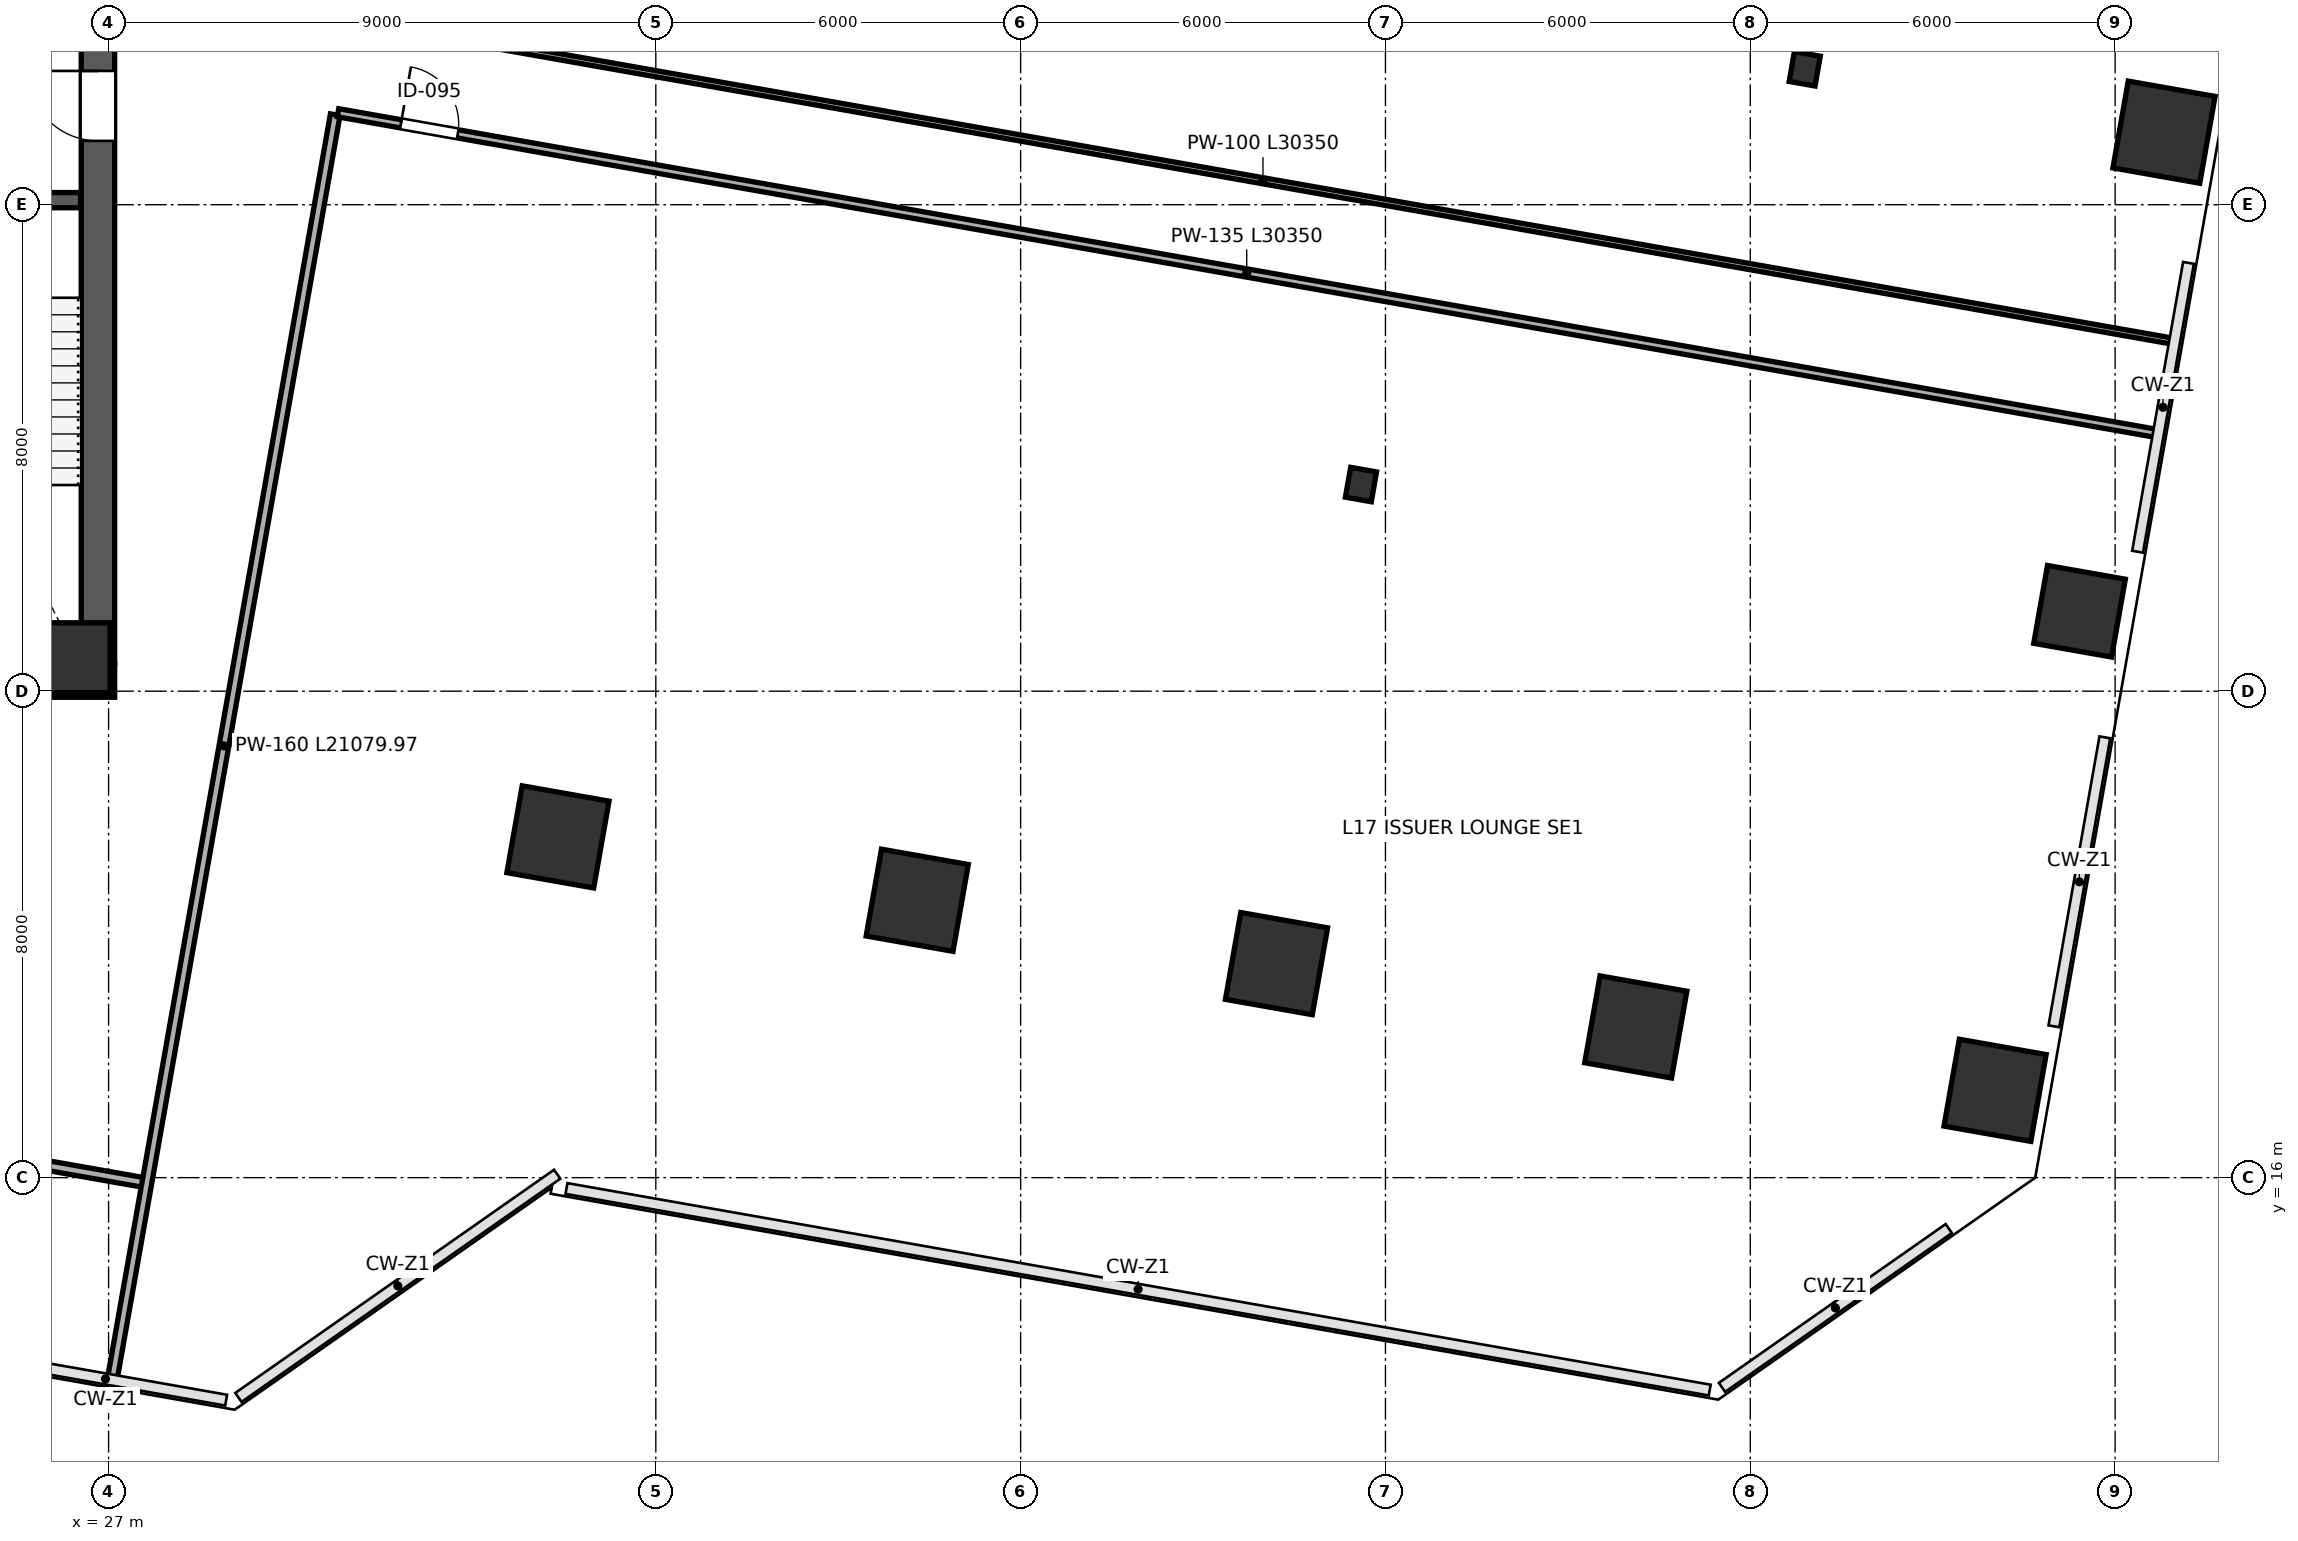
"""IFC4 building model, lengths in metres.
Left out: names, types, materials, properties, quantities, classifications, styles, units other than length and angle.
Written with IfcOpenShell. Run it as: python <this file> out.ifc"""

import sys

from ifc_helpers import new_model, si_unit, direction, frame, frame_2d, origin, origin_2d, place, context, subcontext, project, spatial, rectangle, i_section, extrude, clip, halfspace, source, transform, mapped, element, fill, save


model = new_model("IFC4")
c1 = context("Model", 3, precision=1e-05, world=origin(), true_north=direction((0.0, 1.0)))
c2 = subcontext(c1, "Body", "Model", "MODEL_VIEW")
j1 = project(units=[si_unit("LENGTHUNIT", "METRE"), si_unit("PLANEANGLEUNIT", "RADIAN")], contexts=[c1])
p1 = place(None, origin())
s1 = spatial("IfcSite", under=j1, at=p1, CompositionType="ELEMENT")
p2 = place(p1, origin())
s2 = spatial("IfcBuilding", under=s1, at=p2, CompositionType="ELEMENT")
p3 = place(p2, frame((0.0, 0.0, 79.0)))
s3 = spatial("IfcBuildingStorey", under=s2, at=p3, CompositionType="ELEMENT", Elevation=79.0)
m1 = source(origin(), c2, "Body", "SweptSolid", [
    extrude(rectangle(XDim=1.15, YDim=1.15, at=origin_2d()), origin(), (0.0, 0.0, 1.0), 4.198),
])
p4 = place(p3, frame((26.45, 24.55, 0.001), z_axis=(0.0, 0.0, 1.0), x_axis=(1.0, 0.0, 0.0)))
e1 = element("IfcColumn", 1, at=p4, inside=s3, PredefinedType="COLUMN", context=c2, shape_type="MappedRepresentation", body=[
    mapped(m1, transform((0.0, 0.0, 0.0), scale=1.0)),
])
p5 = place(p3, frame((34.39, 21.604, 0.0), z_axis=(-0.054498728191, -0.066081879773, 0.996324783287), x_axis=(-0.649682625817, 0.760060030732, 0.01487398385)))
e2 = element("IfcColumn", 2, at=p5, inside=s3, PredefinedType="COLUMN", context=c2, shape_type="Clipping", body=[
    clip(clip(extrude(rectangle(XDim=1.45, YDim=1.45, at=origin_2d()), origin(), (0.0, 0.0, 1.0), 4.215), halfspace(frame((0.0, 0.0, 0.073), z_axis=(0.0, 0.0, -1.0), x_axis=(1.0, 0.0, 0.0)), False)), halfspace(frame((0.0, 0.0, 4.142), z_axis=(0.0, 0.0, 1.0), x_axis=(1.0, 0.0, 0.0)), False)),
])
p6 = place(p3, frame((40.299, 20.562, 0.0), z_axis=(-0.060063414038, -0.096390228875, 0.993529722792), x_axis=(-0.744577265686, 0.667244896819, 0.019721640207)))
e3 = element("IfcColumn", 3, at=p6, inside=s3, PredefinedType="COLUMN", context=c2, shape_type="Clipping", body=[
    clip(clip(extrude(rectangle(XDim=1.45, YDim=1.45, at=origin_2d()), origin(), (0.0, 0.0, 1.0), 4.227), halfspace(frame((0.0, 0.0, 0.097), z_axis=(0.0, 0.0, -1.0), x_axis=(1.0, 0.0, 0.0)), False)), halfspace(frame((0.0, 0.0, 4.131), z_axis=(0.0, 0.0, 1.0), x_axis=(1.0, 0.0, 0.0)), False)),
])
p7 = place(p3, frame((46.208, 19.52, 0.0), z_axis=(-0.065535255542, -0.126352432986, 0.989818262591), x_axis=(-0.795075682772, 0.60600639496, 0.024716551802)))
e4 = element("IfcColumn", 4, at=p7, inside=s3, PredefinedType="COLUMN", context=c2, shape_type="Clipping", body=[
    clip(clip(extrude(rectangle(XDim=1.45, YDim=1.45, at=origin_2d()), origin(), (0.0, 0.0, 1.0), 4.243), halfspace(frame((0.0, 0.0, 0.122), z_axis=(0.0, 0.0, -1.0), x_axis=(1.0, 0.0, 0.0)), False)), halfspace(frame((0.0, 0.0, 4.122), z_axis=(0.0, 0.0, 1.0), x_axis=(1.0, 0.0, 0.0)), False)),
])
p8 = place(p3, frame((47.597, 27.398, 0.0), z_axis=(-0.025165317474, -0.134003875884, 0.990661227688), x_axis=(-0.936137546219, 0.350836040709, 0.023676298264)))
e5 = element("IfcColumn", 5, at=p8, inside=s3, PredefinedType="COLUMN", context=c2, shape_type="Clipping", body=[
    clip(clip(extrude(i_section(OverallWidth=0.432, OverallDepth=0.498, WebThickness=0.056, FlangeThickness=0.089, FilletRadius=0.015, at=origin_2d()), origin(), (0.0, 0.0, 1.0), 4.24), halfspace(frame((0.0, 0.0, 0.04), z_axis=(0.0, 0.0, -1.0), x_axis=(1.0, 0.0, 0.0)), False)), halfspace(frame((0.0, 0.0, 4.2), z_axis=(0.0, 0.0, 1.0), x_axis=(1.0, 0.0, 0.0)), False)),
])
p9 = place(p3, frame((48.987, 35.277, 0.0), z_axis=(0.015305043321, -0.141485344082, 0.989822031003), x_axis=(-0.997581110031, 0.064971116092, 0.024712000799)))
e6 = element("IfcColumn", 6, at=p9, inside=s3, PredefinedType="COLUMN", context=c2, shape_type="Clipping", body=[
    clip(clip(extrude(i_section(OverallWidth=0.432, OverallDepth=0.498, WebThickness=0.056, FlangeThickness=0.089, FilletRadius=0.015, at=origin_2d()), origin(), (0.0, 0.0, 1.0), 4.243), halfspace(frame((0.0, 0.0, 0.042), z_axis=(0.0, 0.0, -1.0), x_axis=(1.0, 0.0, 0.0)), False)), halfspace(frame((0.0, 0.0, 4.202), z_axis=(0.0, 0.0, 1.0), x_axis=(1.0, 0.0, 0.0)), False)),
])
p10 = place(p3, frame((52.117, 18.478, 0.0), z_axis=(-0.07095737447, -0.155945868186, 0.985213650537), x_axis=(-0.825524116158, 0.563582114995, 0.029751189863)))
e7 = element("IfcColumn", 7, at=p10, inside=s3, PredefinedType="COLUMN", context=c2, shape_type="Clipping", body=[
    clip(clip(extrude(rectangle(XDim=1.45, YDim=1.45, at=origin_2d()), origin(), (0.0, 0.0, 1.0), 4.263), halfspace(frame((0.0, 0.0, 0.147), z_axis=(0.0, 0.0, -1.0), x_axis=(1.0, 0.0, 0.0)), False)), halfspace(frame((0.0, 0.0, 4.116), z_axis=(0.0, 0.0, 1.0), x_axis=(1.0, 0.0, 0.0)), False)),
])
p11 = place(p3, frame((54.896, 34.235, 0.0), z_axis=(0.009564159458, -0.171009461927, 0.985222965011), x_axis=(-0.992824461786, 0.115823176478, 0.029741887466)))
e8 = element("IfcColumn", 8, at=p11, inside=s3, PredefinedType="COLUMN", context=c2, shape_type="Clipping", body=[
    clip(clip(extrude(i_section(OverallWidth=0.432, OverallDepth=0.498, WebThickness=0.056, FlangeThickness=0.089, FilletRadius=0.015, at=origin_2d()), origin(), (0.0, 0.0, 1.0), 4.263), halfspace(frame((0.0, 0.0, 0.05), z_axis=(0.0, 0.0, -1.0), x_axis=(1.0, 0.0, 0.0)), False)), halfspace(frame((0.0, 0.0, 4.213), z_axis=(0.0, 0.0, 1.0), x_axis=(1.0, 0.0, 0.0)), False)),
])
p12 = place(p3, frame((58.026, 17.436, 0.0), z_axis=(-0.076146400638, -0.185097832517, 0.979765542396), x_axis=(-0.846024447337, 0.532010050022, 0.034755448264)))
e9 = element("IfcColumn", 9, at=p12, inside=s3, PredefinedType="COLUMN", context=c2, shape_type="Clipping", body=[
    clip(clip(extrude(rectangle(XDim=1.45, YDim=1.45, at=origin_2d()), origin(), (0.0, 0.0, 1.0), 4.287), halfspace(frame((0.0, 0.0, 0.172), z_axis=(0.0, 0.0, -1.0), x_axis=(1.0, 0.0, 0.0)), False)), halfspace(frame((0.0, 0.0, 4.114), z_axis=(0.0, 0.0, 1.0), x_axis=(1.0, 0.0, 0.0)), False)),
])
p13 = place(p3, frame((59.415, 25.314, 0.0), z_axis=(-0.036138627315, -0.192720345348, 0.9805880216), x_axis=(-0.936553761677, 0.348866347771, 0.034048830838)))
e10 = element("IfcColumn", 10, at=p13, inside=s3, PredefinedType="COLUMN", context=c2, shape_type="Clipping", body=[
    clip(clip(extrude(rectangle(XDim=1.3, YDim=1.3, at=origin_2d()), origin(), (0.0, 0.0, 1.0), 4.283), halfspace(frame((0.0, 0.0, 0.151), z_axis=(0.0, 0.0, -1.0), x_axis=(1.0, 0.0, 0.0)), False)), halfspace(frame((0.0, 0.0, 4.132), z_axis=(0.0, 0.0, 1.0), x_axis=(1.0, 0.0, 0.0)), False)),
])
p14 = place(p3, frame((60.804, 33.193, 0.0), z_axis=(0.003929750961, -0.200132534446, 0.979760953352), x_axis=(-0.987958013285, 0.150767210127, 0.03475934891)))
e11 = element("IfcColumn", 11, at=p14, inside=s3, PredefinedType="COLUMN", context=c2, shape_type="Clipping", body=[
    clip(clip(extrude(rectangle(XDim=1.45, YDim=1.45, at=origin_2d()), origin(), (0.0, 0.0, 1.0), 4.287), halfspace(frame((0.0, 0.0, 0.172), z_axis=(0.0, 0.0, -1.0), x_axis=(1.0, 0.0, 0.0)), False)), halfspace(frame((0.0, 0.0, 4.114), z_axis=(0.0, 0.0, 1.0), x_axis=(1.0, 0.0, 0.0)), False)),
])
p15 = place(p3, frame((26.825, 24.45, 0.0), z_axis=(0.0, 0.0, 1.0), x_axis=(0.0, 1.0, 0.0)))
e12 = element("IfcWall", 12, at=p15, inside=s3, PredefinedType="SHEAR", context=c2, shape_type="SweptSolid", body=[
    extrude(rectangle(XDim=15.1, YDim=0.55, at=frame_2d((7.55, 0.0))), origin(), (0.0, 0.0, 1.0), 3.96),
])
p16 = place(p15, frame((8.6, 0.0, 0.0)))
e13 = element("IfcOpeningElement", 13, at=p16, cuts=e12, PredefinedType="OPENING", context=c2, shape_type="SweptSolid", body=[
    extrude(rectangle(XDim=1.15, YDim=2.2, at=frame_2d((0.575, 1.1))), frame((0.0, 0.285, 0.0), z_axis=(0.0, -1.0, 0.0), x_axis=(1.0, 0.0, 0.0)), (0.0, 0.0, 1.0), 0.57),
])
p17 = place(p3, frame((8.9, 24.175, 0.0), z_axis=(0.0, 0.0, 1.0), x_axis=(1.0, 0.0, 0.0)))
e14 = element("IfcWall", 14, at=p17, inside=s3, PredefinedType="SHEAR", context=c2, shape_type="SweptSolid", body=[
    extrude(rectangle(XDim=18.2, YDim=0.55, at=frame_2d((9.1, 0.0))), origin(), (0.0, 0.0, 1.0), 3.96),
])
p18 = place(p3, frame((23.19, 32.075, 0.0), z_axis=(0.0, 0.0, 1.0), x_axis=(1.0, 0.0, 0.0)))
e15 = element("IfcWall", 15, at=p18, inside=s3, PredefinedType="SHEAR", context=c2, shape_type="SweptSolid", body=[
    extrude(rectangle(XDim=3.35, YDim=0.25, at=frame_2d((1.675, 0.0))), origin(), (0.0, 0.0, 1.0), 3.96),
])
p19 = place(p18, frame((0.85, 0.0, 0.0)))
e16 = element("IfcOpeningElement", 16, at=p19, cuts=e15, PredefinedType="OPENING", context=c2, shape_type="SweptSolid", body=[
    extrude(rectangle(XDim=1.15, YDim=2.2, at=frame_2d((0.575, 1.1))), frame((0.0, 0.135, 0.0), z_axis=(0.0, -1.0, 0.0), x_axis=(1.0, 0.0, 0.0)), (0.0, 0.0, 1.0), 0.27),
])
p20 = place(p3, frame((9.765, 19.061, 0.0), z_axis=(0.0, 0.0, 1.0), x_axis=(0.984807312871, -0.173650673815, 0.0)))
e17 = element("IfcWall", 17, at=p20, inside=s3, PredefinedType="PARTITIONING", context=c2, shape_type="SweptSolid", body=[
    extrude(rectangle(XDim=18.1, YDim=0.16, at=frame_2d((9.05, 0.0))), origin(), (0.0, 0.0, 1.0), 3.96),
])
p21 = place(p20, frame((1.45, 0.0, 0.0)))
e18 = element("IfcOpeningElement", 18, at=p21, cuts=e17, PredefinedType="OPENING", context=c2, shape_type="SweptSolid", body=[
    extrude(rectangle(XDim=0.95, YDim=2.15, at=frame_2d((0.475, 1.075))), frame((0.0, 0.09, 0.0), z_axis=(0.0, -1.0, 0.0), x_axis=(1.0, 0.0, 0.0)), (0.0, 0.0, 1.0), 0.18),
])
p22 = place(p3, frame((27.067, 12.72, 0.0), z_axis=(0.0, 0.0, 1.0), x_axis=(0.173654514703, 0.984806635601, 0.0)))
e19 = element("IfcWall", 19, at=p22, inside=s3, PredefinedType="PARTITIONING", context=c2, shape_type="SweptSolid", body=[
    extrude(rectangle(XDim=21.08, YDim=0.16, at=frame_2d((10.54, 0.0))), origin(), (0.0, 0.0, 1.0), 3.96),
])
p23 = place(p3, frame((31.041, 35.029, 0.0), z_axis=(0.0, 0.0, 1.0), x_axis=(0.984807519997, -0.173649499156, 0.0)))
e20 = element("IfcWall", 20, at=p23, inside=s3, PredefinedType="PARTITIONING", context=c2, shape_type="SweptSolid", body=[
    extrude(rectangle(XDim=30.35, YDim=0.1, at=frame_2d((15.175, 0.0))), origin(), (0.0, 0.0, 1.0), 3.095),
])
p24 = place(p23, frame((1.05, 0.0, 0.0)))
e21 = element("IfcOpeningElement", 21, at=p24, cuts=e20, PredefinedType="OPENING", context=c2, shape_type="SweptSolid", body=[
    extrude(rectangle(XDim=0.95, YDim=2.15, at=frame_2d((0.475, 1.075))), frame((0.0, 0.06, 0.0), z_axis=(0.0, -1.0, 0.0), x_axis=(1.0, 0.0, 0.0)), (0.0, 0.0, 1.0), 0.12),
])
p25 = place(p3, frame((30.774, 33.513, 0.0), z_axis=(0.0, 0.0, 1.0), x_axis=(0.984807519997, -0.173649499156, 0.0)))
e22 = element("IfcWall", 22, at=p25, inside=s3, PredefinedType="PARTITIONING", context=c2, shape_type="SweptSolid", body=[
    extrude(rectangle(XDim=30.35, YDim=0.135, at=frame_2d((15.175, 0.0))), origin(), (0.0, 0.0, 1.0), 3.095),
])
p26 = place(p25, frame((1.05, 0.0, 0.0)))
e23 = element("IfcOpeningElement", 23, at=p26, cuts=e22, PredefinedType="OPENING", context=c2, shape_type="SweptSolid", body=[
    extrude(rectangle(XDim=0.95, YDim=2.15, at=frame_2d((0.475, 1.075))), frame((0.0, 0.078, 0.0), z_axis=(0.0, -1.0, 0.0), x_axis=(1.0, 0.0, 0.0)), (0.0, 0.0, 1.0), 0.155),
])
m2 = source(origin(), c2, "Body", "SweptSolid", [
    extrude(rectangle(XDim=1.15, YDim=2.2, at=frame_2d((0.575, 1.1))), frame((0.0, 0.025, 0.0), z_axis=(0.0, -1.0, 0.0), x_axis=(1.0, 0.0, 0.0)), (0.0, 0.0, 1.0), 0.05),
])
p27 = place(p16, origin())
e24 = element("IfcDoor", 24, at=p27, inside=s3, OperationType="SINGLE_SWING_RIGHT", PredefinedType="DOOR", context=c2, shape_type="MappedRepresentation", body=[
    mapped(m2, transform((0.0, 0.0, 0.0), scale=1.0)),
])
fill(e13, e24)
m3 = source(origin(), c2, "Body", "SweptSolid", [
    extrude(rectangle(XDim=0.95, YDim=2.15, at=frame_2d((0.475, 1.075))), frame((0.0, 0.025, 0.0), z_axis=(0.0, -1.0, 0.0), x_axis=(1.0, 0.0, 0.0)), (0.0, 0.0, 1.0), 0.05),
])
p28 = place(p26, origin())
e25 = element("IfcDoor", 25, at=p28, inside=s3, OperationType="SINGLE_SWING_LEFT", PredefinedType="DOOR", context=c2, shape_type="MappedRepresentation", body=[
    mapped(m3, transform((0.0, 0.0, 0.0), scale=1.0)),
])
fill(e23, e25)
save(model, sys.argv[1])
